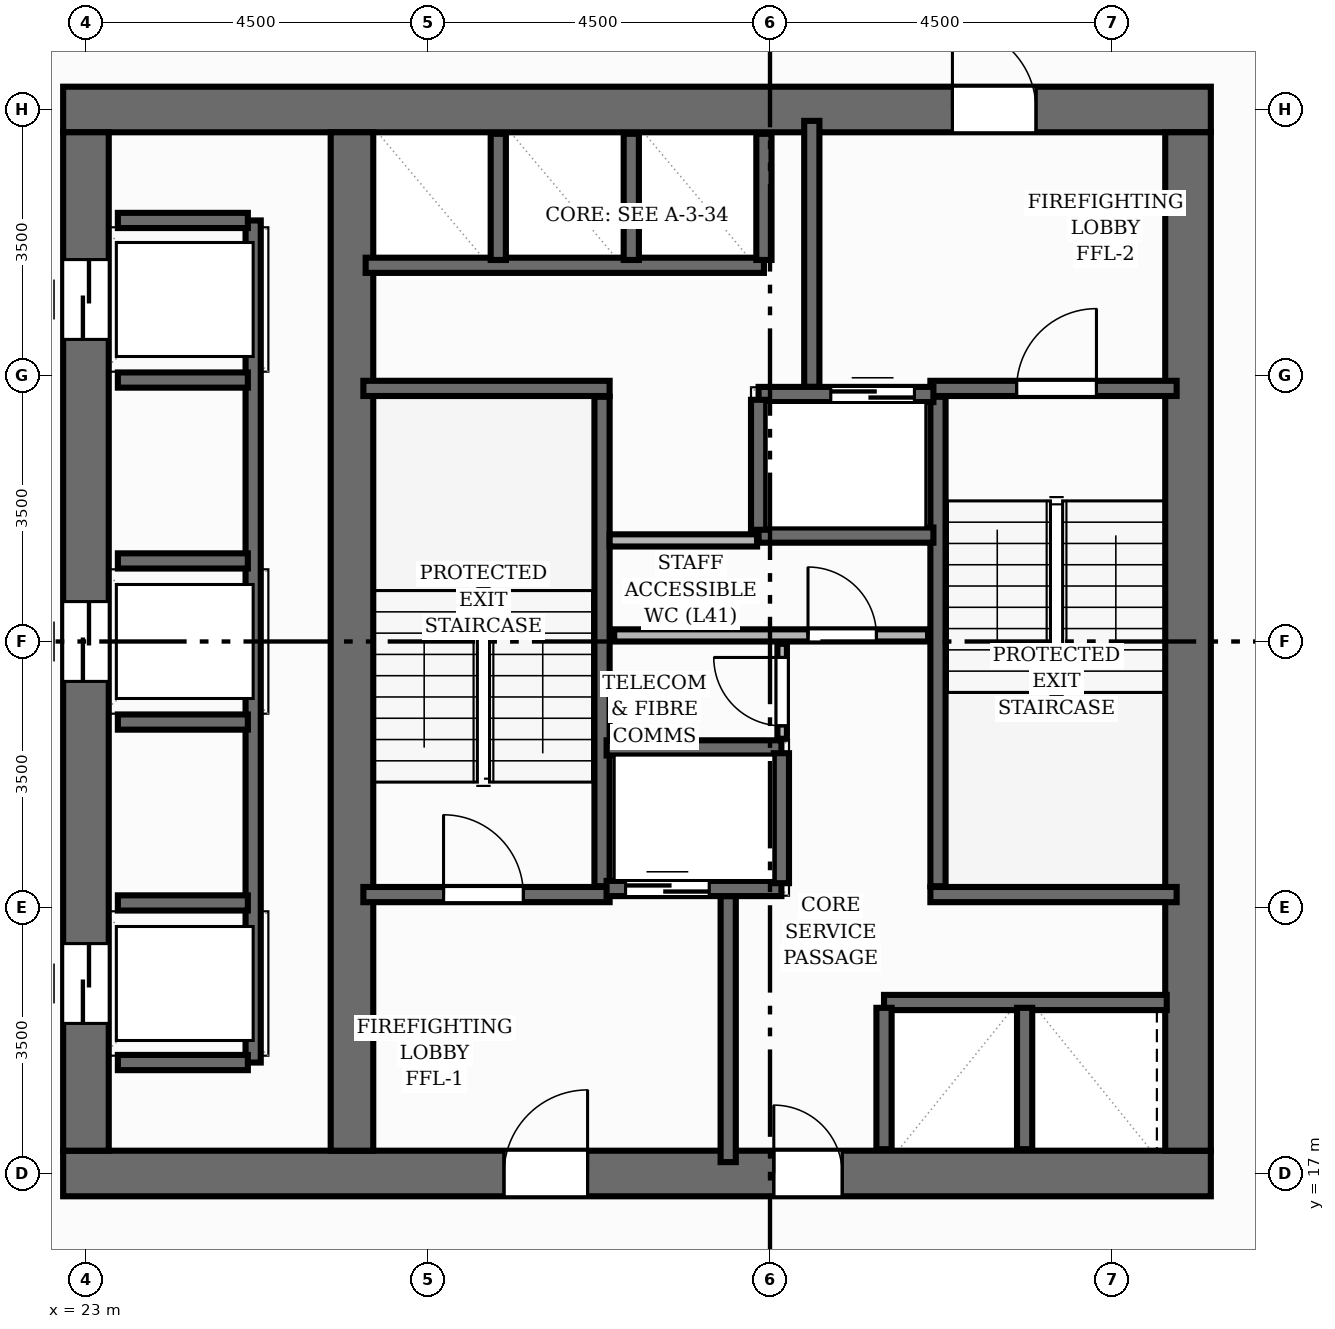
"""IFC4 building model, lengths in metres.
Left out: names, types, materials, properties, quantities, classifications, styles, units other than length and angle.
Written with IfcOpenShell. Run it as: python <this file> out.ifc"""

import sys

from ifc_helpers import new_model, si_unit, direction, frame, frame_2d, origin, place, context, subcontext, project, spatial, rectangle, extrude, element, fill, save


model = new_model("IFC4")
c1 = context("Model", 3, precision=1e-05, world=origin(), true_north=direction((0.0, 1.0)))
c2 = subcontext(c1, "Body", "Model", "MODEL_VIEW")
j1 = project(units=[si_unit("LENGTHUNIT", "METRE"), si_unit("PLANEANGLEUNIT", "RADIAN")], contexts=[c1])
p1 = place(None, origin())
s1 = spatial("IfcSite", under=j1, at=p1, CompositionType="ELEMENT")
p2 = place(p1, origin())
s2 = spatial("IfcBuilding", under=s1, at=p2, CompositionType="ELEMENT")
p3 = place(p2, frame((0.0, 0.0, 139.36)))
s3 = spatial("IfcBuildingStorey", under=s2, at=p3, CompositionType="ELEMENT", Elevation=139.36)
p4 = place(p3, frame((22.7, 17.0, 0.0), z_axis=(0.0, 0.0, 1.0), x_axis=(1.0, 0.0, 0.0)))
e1 = element("IfcWall", 1, at=p4, inside=s3, PredefinedType="SHEAR", context=c2, shape_type="SweptSolid", body=[
    extrude(rectangle(XDim=15.1, YDim=0.6, at=frame_2d((7.55, 0.0))), origin(), (0.0, 0.0, 1.0), 3.2),
])
p5 = place(p4, frame((5.8, 0.0, 0.0)))
e2 = element("IfcOpeningElement", 2, at=p5, cuts=e1, PredefinedType="OPENING", context=c2, shape_type="SweptSolid", body=[
    extrude(rectangle(XDim=1.1, YDim=2.15, at=frame_2d((0.55, 1.075))), frame((0.0, 0.31, 0.0), z_axis=(0.0, -1.0, 0.0), x_axis=(1.0, 0.0, 0.0)), (0.0, 0.0, 1.0), 0.62),
])
p6 = place(p4, frame((9.35, 0.0, 0.0)))
e3 = element("IfcOpeningElement", 3, at=p6, cuts=e1, PredefinedType="OPENING", context=c2, shape_type="SweptSolid", body=[
    extrude(rectangle(XDim=0.9, YDim=2.1, at=frame_2d((0.45, 1.05))), frame((0.0, 0.31, 0.0), z_axis=(0.0, -1.0, 0.0), x_axis=(1.0, 0.0, 0.0)), (0.0, 0.0, 1.0), 0.62),
])
p7 = place(p3, frame((22.7, 31.0, 0.0), z_axis=(0.0, 0.0, 1.0), x_axis=(1.0, 0.0, 0.0)))
e4 = element("IfcWall", 4, at=p7, inside=s3, PredefinedType="SHEAR", context=c2, shape_type="SweptSolid", body=[
    extrude(rectangle(XDim=15.1, YDim=0.6, at=frame_2d((7.55, 0.0))), origin(), (0.0, 0.0, 1.0), 3.2),
])
p8 = place(p7, frame((11.7, 0.0, 0.0)))
e5 = element("IfcOpeningElement", 5, at=p8, cuts=e4, PredefinedType="OPENING", context=c2, shape_type="SweptSolid", body=[
    extrude(rectangle(XDim=1.1, YDim=2.15, at=frame_2d((0.55, 1.075))), frame((0.0, 0.31, 0.0), z_axis=(0.0, -1.0, 0.0), x_axis=(1.0, 0.0, 0.0)), (0.0, 0.0, 1.0), 0.62),
])
p9 = place(p3, frame((23.0, 17.3, 0.0), z_axis=(0.0, 0.0, 1.0), x_axis=(0.0, 1.0, 0.0)))
e6 = element("IfcWall", 6, at=p9, inside=s3, PredefinedType="SHEAR", context=c2, shape_type="SweptSolid", body=[
    extrude(rectangle(XDim=13.4, YDim=0.6, at=frame_2d((6.7, 0.0))), origin(), (0.0, 0.0, 1.0), 3.2),
])
p10 = place(p9, frame((1.675, 0.0, 0.0)))
e7 = element("IfcOpeningElement", 7, at=p10, cuts=e6, PredefinedType="OPENING", context=c2, shape_type="SweptSolid", body=[
    extrude(rectangle(XDim=1.05, YDim=2.15, at=frame_2d((0.525, 1.075))), frame((0.0, 0.31, 0.0), z_axis=(0.0, -1.0, 0.0), x_axis=(1.0, 0.0, 0.0)), (0.0, 0.0, 1.0), 0.62),
])
p11 = place(p9, frame((6.175, 0.0, 0.0)))
e8 = element("IfcOpeningElement", 8, at=p11, cuts=e6, PredefinedType="OPENING", context=c2, shape_type="SweptSolid", body=[
    extrude(rectangle(XDim=1.05, YDim=2.15, at=frame_2d((0.525, 1.075))), frame((0.0, 0.31, 0.0), z_axis=(0.0, -1.0, 0.0), x_axis=(1.0, 0.0, 0.0)), (0.0, 0.0, 1.0), 0.62),
])
p12 = place(p9, frame((10.675, 0.0, 0.0)))
e9 = element("IfcOpeningElement", 9, at=p12, cuts=e6, PredefinedType="OPENING", context=c2, shape_type="SweptSolid", body=[
    extrude(rectangle(XDim=1.05, YDim=2.15, at=frame_2d((0.525, 1.075))), frame((0.0, 0.31, 0.0), z_axis=(0.0, -1.0, 0.0), x_axis=(1.0, 0.0, 0.0)), (0.0, 0.0, 1.0), 0.62),
])
p13 = place(p3, frame((37.5, 17.3, 0.0), z_axis=(0.0, 0.0, 1.0), x_axis=(0.0, 1.0, 0.0)))
e10 = element("IfcWall", 10, at=p13, inside=s3, PredefinedType="SHEAR", context=c2, shape_type="SweptSolid", body=[
    extrude(rectangle(XDim=13.4, YDim=0.6, at=frame_2d((6.7, 0.0))), origin(), (0.0, 0.0, 1.0), 3.2),
])
p14 = place(p3, frame((26.5, 17.3, 0.0), z_axis=(0.0, 0.0, 1.0), x_axis=(0.0, 1.0, 0.0)))
e11 = element("IfcWall", 11, at=p14, inside=s3, PredefinedType="SHEAR", context=c2, shape_type="SweptSolid", body=[
    extrude(rectangle(XDim=13.4, YDim=0.56, at=frame_2d((6.7, 0.0))), origin(), (0.0, 0.0, 1.0), 3.2),
])
p15 = place(p3, frame((29.79, 20.78, 0.0), z_axis=(0.0, 0.0, 1.0), x_axis=(0.0, 1.0, 0.0)))
e12 = element("IfcWall", 12, at=p15, inside=s3, PredefinedType="SHEAR", context=c2, shape_type="SweptSolid", body=[
    extrude(rectangle(XDim=6.44, YDim=0.2, at=frame_2d((3.22, 0.0))), origin(), (0.0, 0.0, 1.0), 3.2),
])
p16 = place(p3, frame((26.65, 27.33, 0.0), z_axis=(0.0, 0.0, 1.0), x_axis=(1.0, 0.0, 0.0)))
e13 = element("IfcWall", 13, at=p16, inside=s3, PredefinedType="SHEAR", context=c2, shape_type="SweptSolid", body=[
    extrude(rectangle(XDim=3.24, YDim=0.2, at=frame_2d((1.62, 0.0))), origin(), (0.0, 0.0, 1.0), 3.2),
])
p17 = place(p3, frame((26.65, 20.67, 0.0), z_axis=(0.0, 0.0, 1.0), x_axis=(1.0, 0.0, 0.0)))
e14 = element("IfcWall", 14, at=p17, inside=s3, PredefinedType="SHEAR", context=c2, shape_type="SweptSolid", body=[
    extrude(rectangle(XDim=3.24, YDim=0.2, at=frame_2d((1.62, 0.0))), origin(), (0.0, 0.0, 1.0), 3.2),
])
p18 = place(p17, frame((1.055, 0.0, 0.0)))
e15 = element("IfcOpeningElement", 15, at=p18, cuts=e14, PredefinedType="OPENING", context=c2, shape_type="SweptSolid", body=[
    extrude(rectangle(XDim=1.05, YDim=2.15, at=frame_2d((0.525, 1.075))), frame((0.0, 0.11, 0.0), z_axis=(0.0, -1.0, 0.0), x_axis=(1.0, 0.0, 0.0)), (0.0, 0.0, 1.0), 0.22),
])
p19 = place(p3, frame((34.21, 20.78, 0.0), z_axis=(0.0, 0.0, 1.0), x_axis=(0.0, 1.0, 0.0)))
e16 = element("IfcWall", 16, at=p19, inside=s3, PredefinedType="SHEAR", context=c2, shape_type="SweptSolid", body=[
    extrude(rectangle(XDim=6.44, YDim=0.2, at=frame_2d((3.22, 0.0))), origin(), (0.0, 0.0, 1.0), 3.2),
])
p20 = place(p3, frame((34.11, 20.67, 0.0), z_axis=(0.0, 0.0, 1.0), x_axis=(1.0, 0.0, 0.0)))
e17 = element("IfcWall", 17, at=p20, inside=s3, PredefinedType="SHEAR", context=c2, shape_type="SweptSolid", body=[
    extrude(rectangle(XDim=3.24, YDim=0.2, at=frame_2d((1.62, 0.0))), origin(), (0.0, 0.0, 1.0), 3.2),
])
p21 = place(p3, frame((34.11, 27.33, 0.0), z_axis=(0.0, 0.0, 1.0), x_axis=(1.0, 0.0, 0.0)))
e18 = element("IfcWall", 18, at=p21, inside=s3, PredefinedType="SHEAR", context=c2, shape_type="SweptSolid", body=[
    extrude(rectangle(XDim=3.24, YDim=0.2, at=frame_2d((1.62, 0.0))), origin(), (0.0, 0.0, 1.0), 3.2),
])
p22 = place(p21, frame((1.135, 0.0, 0.0)))
e19 = element("IfcOpeningElement", 19, at=p22, cuts=e18, PredefinedType="OPENING", context=c2, shape_type="SweptSolid", body=[
    extrude(rectangle(XDim=1.05, YDim=2.15, at=frame_2d((0.525, 1.075))), frame((0.0, 0.11, 0.0), z_axis=(0.0, -1.0, 0.0), x_axis=(1.0, 0.0, 0.0)), (0.0, 0.0, 1.0), 0.22),
])
for number, where, z_axis, x_axis in (
    (20, (31.45, 17.15, 0.0), (0.0, 0.0, 1.0), (0.0, 1.0, 0.0)),
    (21, (32.55, 27.35, 0.0), (0.0, 0.0, 1.0), (0.0, 1.0, 0.0)),
):
    element("IfcWall", number, at=place(p3, frame(where, z_axis=z_axis, x_axis=x_axis)), inside=s3, PredefinedType="SHEAR", context=c2, shape_type="SweptSolid", body=[
        extrude(rectangle(XDim=3.5, YDim=0.2, at=frame_2d((1.75, 0.0))), origin(), (0.0, 0.0, 1.0), 3.2),
    ])
p23 = place(p3, frame((29.85, 20.75, 0.0), z_axis=(0.0, 0.0, 1.0), x_axis=(1.0, 0.0, 0.0)))
e22 = element("IfcWall", 22, at=p23, inside=s3, PredefinedType="SHEAR", context=c2, shape_type="SweptSolid", body=[
    extrude(rectangle(XDim=2.3, YDim=0.2, at=frame_2d((1.15, 0.0))), origin(), (0.0, 0.0, 1.0), 3.2),
])
p24 = place(p23, frame((0.25, 0.0, 0.0)))
e23 = element("IfcOpeningElement", 23, at=p24, cuts=e22, PredefinedType="OPENING", context=c2, shape_type="SweptSolid", body=[
    extrude(rectangle(XDim=1.1, YDim=2.15, at=frame_2d((0.55, 1.075))), frame((0.0, 0.11, 0.0), z_axis=(0.0, -1.0, 0.0), x_axis=(1.0, 0.0, 0.0)), (0.0, 0.0, 1.0), 0.22),
])
p25 = place(p3, frame((29.85, 22.6, 0.0), z_axis=(0.0, 0.0, 1.0), x_axis=(1.0, 0.0, 0.0)))
e24 = element("IfcWall", 24, at=p25, inside=s3, PredefinedType="SHEAR", context=c2, shape_type="SweptSolid", body=[
    extrude(rectangle(XDim=2.3, YDim=0.2, at=frame_2d((1.15, 0.0))), origin(), (0.0, 0.0, 1.0), 3.2),
])
p26 = place(p3, frame((32.15, 20.82, 0.0), z_axis=(0.0, 0.0, 1.0), x_axis=(0.0, 1.0, 0.0)))
e25 = element("IfcWall", 25, at=p26, inside=s3, PredefinedType="SHEAR", context=c2, shape_type="SweptSolid", body=[
    extrude(rectangle(XDim=1.71, YDim=0.2, at=frame_2d((0.855, 0.0))), origin(), (0.0, 0.0, 1.0), 3.2),
])
p27 = place(p3, frame((31.85, 27.25, 0.0), z_axis=(0.0, 0.0, 1.0), x_axis=(1.0, 0.0, 0.0)))
e26 = element("IfcWall", 26, at=p27, inside=s3, PredefinedType="SHEAR", context=c2, shape_type="SweptSolid", body=[
    extrude(rectangle(XDim=2.3, YDim=0.2, at=frame_2d((1.15, 0.0))), origin(), (0.0, 0.0, 1.0), 3.2),
])
p28 = place(p27, frame((0.95, 0.0, 0.0)))
e27 = element("IfcOpeningElement", 27, at=p28, cuts=e26, PredefinedType="OPENING", context=c2, shape_type="SweptSolid", body=[
    extrude(rectangle(XDim=1.1, YDim=2.15, at=frame_2d((0.55, 1.075))), frame((0.0, 0.11, 0.0), z_axis=(0.0, -1.0, 0.0), x_axis=(1.0, 0.0, 0.0)), (0.0, 0.0, 1.0), 0.22),
])
p29 = place(p3, frame((31.85, 25.4, 0.0), z_axis=(0.0, 0.0, 1.0), x_axis=(1.0, 0.0, 0.0)))
e28 = element("IfcWall", 28, at=p29, inside=s3, PredefinedType="SHEAR", context=c2, shape_type="SweptSolid", body=[
    extrude(rectangle(XDim=2.3, YDim=0.2, at=frame_2d((1.15, 0.0))), origin(), (0.0, 0.0, 1.0), 3.2),
])
p30 = place(p3, frame((31.85, 25.47, 0.0), z_axis=(0.0, 0.0, 1.0), x_axis=(0.0, 1.0, 0.0)))
e29 = element("IfcWall", 29, at=p30, inside=s3, PredefinedType="SHEAR", context=c2, shape_type="SweptSolid", body=[
    extrude(rectangle(XDim=1.71, YDim=0.2, at=frame_2d((0.855, 0.0))), origin(), (0.0, 0.0, 1.0), 3.2),
])
p31 = place(p3, frame((25.2, 18.46, 0.0), z_axis=(0.0, 0.0, 1.0), x_axis=(0.0, 1.0, 0.0)))
e30 = element("IfcWall", 30, at=p31, inside=s3, PredefinedType="SHEAR", context=c2, shape_type="SweptSolid", body=[
    extrude(rectangle(XDim=11.08, YDim=0.2, at=frame_2d((5.54, 0.0))), origin(), (0.0, 0.0, 1.0), 3.2),
])
for number, where, z_axis, x_axis in (
    (31, (23.42, 18.46, 0.0), (0.0, 0.0, 1.0), (1.0, 0.0, 0.0)),
    (32, (23.42, 29.54, 0.0), (0.0, 0.0, 1.0), (1.0, 0.0, 0.0)),
    (33, (23.42, 20.56, 0.0), (0.0, 0.0, 1.0), (1.0, 0.0, 0.0)),
    (34, (23.42, 22.94, 0.0), (0.0, 0.0, 1.0), (1.0, 0.0, 0.0)),
    (35, (23.42, 25.06, 0.0), (0.0, 0.0, 1.0), (1.0, 0.0, 0.0)),
    (36, (23.42, 27.44, 0.0), (0.0, 0.0, 1.0), (1.0, 0.0, 0.0)),
):
    element("IfcWall", number, at=place(p3, frame(where, z_axis=z_axis, x_axis=x_axis)), inside=s3, PredefinedType="SHEAR", context=c2, shape_type="SweptSolid", body=[
        extrude(rectangle(XDim=1.71, YDim=0.2, at=frame_2d((0.855, 0.0))), origin(), (0.0, 0.0, 1.0), 3.2),
    ])
p32 = place(p3, frame((26.68, 28.95, 0.0), z_axis=(0.0, 0.0, 1.0), x_axis=(1.0, 0.0, 0.0)))
e37 = element("IfcWall", 37, at=p32, inside=s3, PredefinedType="SHEAR", context=c2, shape_type="SweptSolid", body=[
    extrude(rectangle(XDim=5.24, YDim=0.2, at=frame_2d((2.62, 0.0))), origin(), (0.0, 0.0, 1.0), 3.2),
])
for number, where, z_axis, x_axis in (
    (38, (31.92, 29.02, 0.0), (0.0, 0.0, 1.0), (0.0, 1.0, 0.0)),
    (39, (28.425, 29.02, 0.0), (0.0, 0.0, 1.0), (0.0, 1.0, 0.0)),
    (40, (30.175, 29.02, 0.0), (0.0, 0.0, 1.0), (0.0, 1.0, 0.0)),
):
    element("IfcWall", number, at=place(p3, frame(where, z_axis=z_axis, x_axis=x_axis)), inside=s3, PredefinedType="SHEAR", context=c2, shape_type="SweptSolid", body=[
        extrude(rectangle(XDim=1.66, YDim=0.2, at=frame_2d((0.83, 0.0))), origin(), (0.0, 0.0, 1.0), 3.2),
    ])
p33 = place(p3, frame((33.5, 19.25, 0.0), z_axis=(0.0, 0.0, 1.0), x_axis=(1.0, 0.0, 0.0)))
e41 = element("IfcWall", 41, at=p33, inside=s3, PredefinedType="SHEAR", context=c2, shape_type="SweptSolid", body=[
    extrude(rectangle(XDim=3.72, YDim=0.2, at=frame_2d((1.86, 0.0))), origin(), (0.0, 0.0, 1.0), 3.2),
])
for number, where, z_axis, x_axis in (
    (42, (33.5, 17.32, 0.0), (0.0, 0.0, 1.0), (0.0, 1.0, 0.0)),
    (43, (35.35, 17.32, 0.0), (0.0, 0.0, 1.0), (0.0, 1.0, 0.0)),
):
    element("IfcWall", number, at=place(p3, frame(where, z_axis=z_axis, x_axis=x_axis)), inside=s3, PredefinedType="SHEAR", context=c2, shape_type="SweptSolid", body=[
        extrude(rectangle(XDim=1.86, YDim=0.2, at=frame_2d((0.93, 0.0))), origin(), (0.0, 0.0, 1.0), 3.2),
    ])
p34 = place(p3, frame((29.95, 24.08, 0.0), z_axis=(0.0, 0.0, 1.0), x_axis=(1.0, 0.0, 0.0)))
e44 = element("IfcWall", 44, at=p34, inside=s3, PredefinedType="PLUMBINGWALL", context=c2, shape_type="SweptSolid", body=[
    extrude(rectangle(XDim=4.13, YDim=0.16, at=frame_2d((2.065, 0.0))), origin(), (0.0, 0.0, 1.0), 2.955),
])
p35 = place(p34, frame((2.55, 0.0, 0.0)))
e45 = element("IfcOpeningElement", 45, at=p35, cuts=e44, PredefinedType="OPENING", context=c2, shape_type="SweptSolid", body=[
    extrude(rectangle(XDim=0.9, YDim=2.1, at=frame_2d((0.45, 1.05))), frame((0.0, 0.09, 0.0), z_axis=(0.0, -1.0, 0.0), x_axis=(1.0, 0.0, 0.0)), (0.0, 0.0, 1.0), 0.18),
])
p36 = place(p3, frame((32.16, 22.72, 0.0), z_axis=(0.0, 0.0, 1.0), x_axis=(0.0, 1.0, 0.0)))
e46 = element("IfcWall", 46, at=p36, inside=s3, PredefinedType="PARTITIONING", context=c2, shape_type="SweptSolid", body=[
    extrude(rectangle(XDim=1.25, YDim=0.125, at=frame_2d((0.625, 0.0))), origin(), (0.0, 0.0, 1.0), 2.955),
])
p37 = place(p36, frame((0.17, 0.0, 0.0)))
e47 = element("IfcOpeningElement", 47, at=p37, cuts=e46, PredefinedType="OPENING", context=c2, shape_type="SweptSolid", body=[
    extrude(rectangle(XDim=0.9, YDim=2.1, at=frame_2d((0.45, 1.05))), frame((0.0, 0.073, 0.0), z_axis=(0.0, -1.0, 0.0), x_axis=(1.0, 0.0, 0.0)), (0.0, 0.0, 1.0), 0.145),
])
p38 = place(p3, frame((29.89, 25.33, 0.0), z_axis=(0.0, 0.0, 1.0), x_axis=(1.0, 0.0, 0.0)))
e48 = element("IfcWall", 48, at=p38, inside=s3, PredefinedType="PLUMBINGWALL", context=c2, shape_type="SweptSolid", body=[
    extrude(rectangle(XDim=1.94, YDim=0.16, at=frame_2d((0.97, 0.0))), origin(), (0.0, 0.0, 1.0), 2.955),
])
p39 = place(p18, origin())
e49 = element("IfcDoor", 49, at=p39, inside=s3, OperationType="SINGLE_SWING_LEFT", PredefinedType="DOOR", context=c2, shape_type="SweptSolid", body=[
    extrude(rectangle(XDim=1.05, YDim=2.15, at=frame_2d((0.525, 1.075))), frame((0.0, 0.025, 0.0), z_axis=(0.0, -1.0, 0.0), x_axis=(1.0, 0.0, 0.0)), (0.0, 0.0, 1.0), 0.05),
])
fill(e15, e49)
p40 = place(p22, origin())
e50 = element("IfcDoor", 50, at=p40, inside=s3, OperationType="SINGLE_SWING_RIGHT", PredefinedType="DOOR", context=c2, shape_type="SweptSolid", body=[
    extrude(rectangle(XDim=1.05, YDim=2.15, at=frame_2d((0.525, 1.075))), frame((0.0, 0.025, 0.0), z_axis=(0.0, -1.0, 0.0), x_axis=(1.0, 0.0, 0.0)), (0.0, 0.0, 1.0), 0.05),
])
fill(e19, e50)
p41 = place(p5, origin())
e51 = element("IfcDoor", 51, at=p41, inside=s3, OperationType="SINGLE_SWING_RIGHT", PredefinedType="DOOR", context=c2, shape_type="SweptSolid", body=[
    extrude(rectangle(XDim=1.1, YDim=2.15, at=frame_2d((0.55, 1.075))), frame((0.0, 0.025, 0.0), z_axis=(0.0, -1.0, 0.0), x_axis=(1.0, 0.0, 0.0)), (0.0, 0.0, 1.0), 0.05),
])
fill(e2, e51)
p42 = place(p8, origin())
e52 = element("IfcDoor", 52, at=p42, inside=s3, OperationType="SINGLE_SWING_LEFT", PredefinedType="DOOR", context=c2, shape_type="SweptSolid", body=[
    extrude(rectangle(XDim=1.1, YDim=2.15, at=frame_2d((0.55, 1.075))), frame((0.0, 0.025, 0.0), z_axis=(0.0, -1.0, 0.0), x_axis=(1.0, 0.0, 0.0)), (0.0, 0.0, 1.0), 0.05),
])
fill(e5, e52)
p43 = place(p24, origin())
e53 = element("IfcDoor", 53, at=p43, inside=s3, OperationType="DOUBLE_DOOR_SLIDING", PredefinedType="DOOR", context=c2, shape_type="SweptSolid", body=[
    extrude(rectangle(XDim=1.1, YDim=2.15, at=frame_2d((0.55, 1.075))), frame((0.0, 0.025, 0.0), z_axis=(0.0, -1.0, 0.0), x_axis=(1.0, 0.0, 0.0)), (0.0, 0.0, 1.0), 0.05),
])
fill(e23, e53)
p44 = place(p28, origin())
e54 = element("IfcDoor", 54, at=p44, inside=s3, OperationType="DOUBLE_DOOR_SLIDING", PredefinedType="DOOR", context=c2, shape_type="SweptSolid", body=[
    extrude(rectangle(XDim=1.1, YDim=2.15, at=frame_2d((0.55, 1.075))), frame((0.0, 0.025, 0.0), z_axis=(0.0, -1.0, 0.0), x_axis=(1.0, 0.0, 0.0)), (0.0, 0.0, 1.0), 0.05),
])
fill(e27, e54)
p45 = place(p10, origin())
e55 = element("IfcDoor", 55, at=p45, inside=s3, OperationType="DOUBLE_DOOR_SLIDING", PredefinedType="DOOR", context=c2, shape_type="SweptSolid", body=[
    extrude(rectangle(XDim=1.05, YDim=2.15, at=frame_2d((0.525, 1.075))), frame((0.0, 0.025, 0.0), z_axis=(0.0, -1.0, 0.0), x_axis=(1.0, 0.0, 0.0)), (0.0, 0.0, 1.0), 0.05),
])
fill(e7, e55)
p46 = place(p11, origin())
e56 = element("IfcDoor", 56, at=p46, inside=s3, OperationType="DOUBLE_DOOR_SLIDING", PredefinedType="DOOR", context=c2, shape_type="SweptSolid", body=[
    extrude(rectangle(XDim=1.05, YDim=2.15, at=frame_2d((0.525, 1.075))), frame((0.0, 0.025, 0.0), z_axis=(0.0, -1.0, 0.0), x_axis=(1.0, 0.0, 0.0)), (0.0, 0.0, 1.0), 0.05),
])
fill(e8, e56)
p47 = place(p12, origin())
e57 = element("IfcDoor", 57, at=p47, inside=s3, OperationType="DOUBLE_DOOR_SLIDING", PredefinedType="DOOR", context=c2, shape_type="SweptSolid", body=[
    extrude(rectangle(XDim=1.05, YDim=2.15, at=frame_2d((0.525, 1.075))), frame((0.0, 0.025, 0.0), z_axis=(0.0, -1.0, 0.0), x_axis=(1.0, 0.0, 0.0)), (0.0, 0.0, 1.0), 0.05),
])
fill(e9, e57)
p48 = place(p6, origin())
e58 = element("IfcDoor", 58, at=p48, inside=s3, OperationType="SINGLE_SWING_LEFT", PredefinedType="DOOR", context=c2, shape_type="SweptSolid", body=[
    extrude(rectangle(XDim=0.9, YDim=2.1, at=frame_2d((0.45, 1.05))), frame((0.0, 0.025, 0.0), z_axis=(0.0, -1.0, 0.0), x_axis=(1.0, 0.0, 0.0)), (0.0, 0.0, 1.0), 0.05),
])
fill(e3, e58)
p49 = place(p35, origin())
e59 = element("IfcDoor", 59, at=p49, inside=s3, OperationType="SINGLE_SWING_LEFT", PredefinedType="DOOR", context=c2, shape_type="SweptSolid", body=[
    extrude(rectangle(XDim=0.9, YDim=2.1, at=frame_2d((0.45, 1.05))), frame((0.0, 0.025, 0.0), z_axis=(0.0, -1.0, 0.0), x_axis=(1.0, 0.0, 0.0)), (0.0, 0.0, 1.0), 0.05),
])
fill(e45, e59)
p50 = place(p37, origin())
e60 = element("IfcDoor", 60, at=p50, inside=s3, OperationType="SINGLE_SWING_RIGHT", PredefinedType="DOOR", context=c2, shape_type="SweptSolid", body=[
    extrude(rectangle(XDim=0.9, YDim=2.1, at=frame_2d((0.45, 1.05))), frame((0.0, 0.025, 0.0), z_axis=(0.0, -1.0, 0.0), x_axis=(1.0, 0.0, 0.0)), (0.0, 0.0, 1.0), 0.05),
])
fill(e47, e60)
save(model, sys.argv[1])
